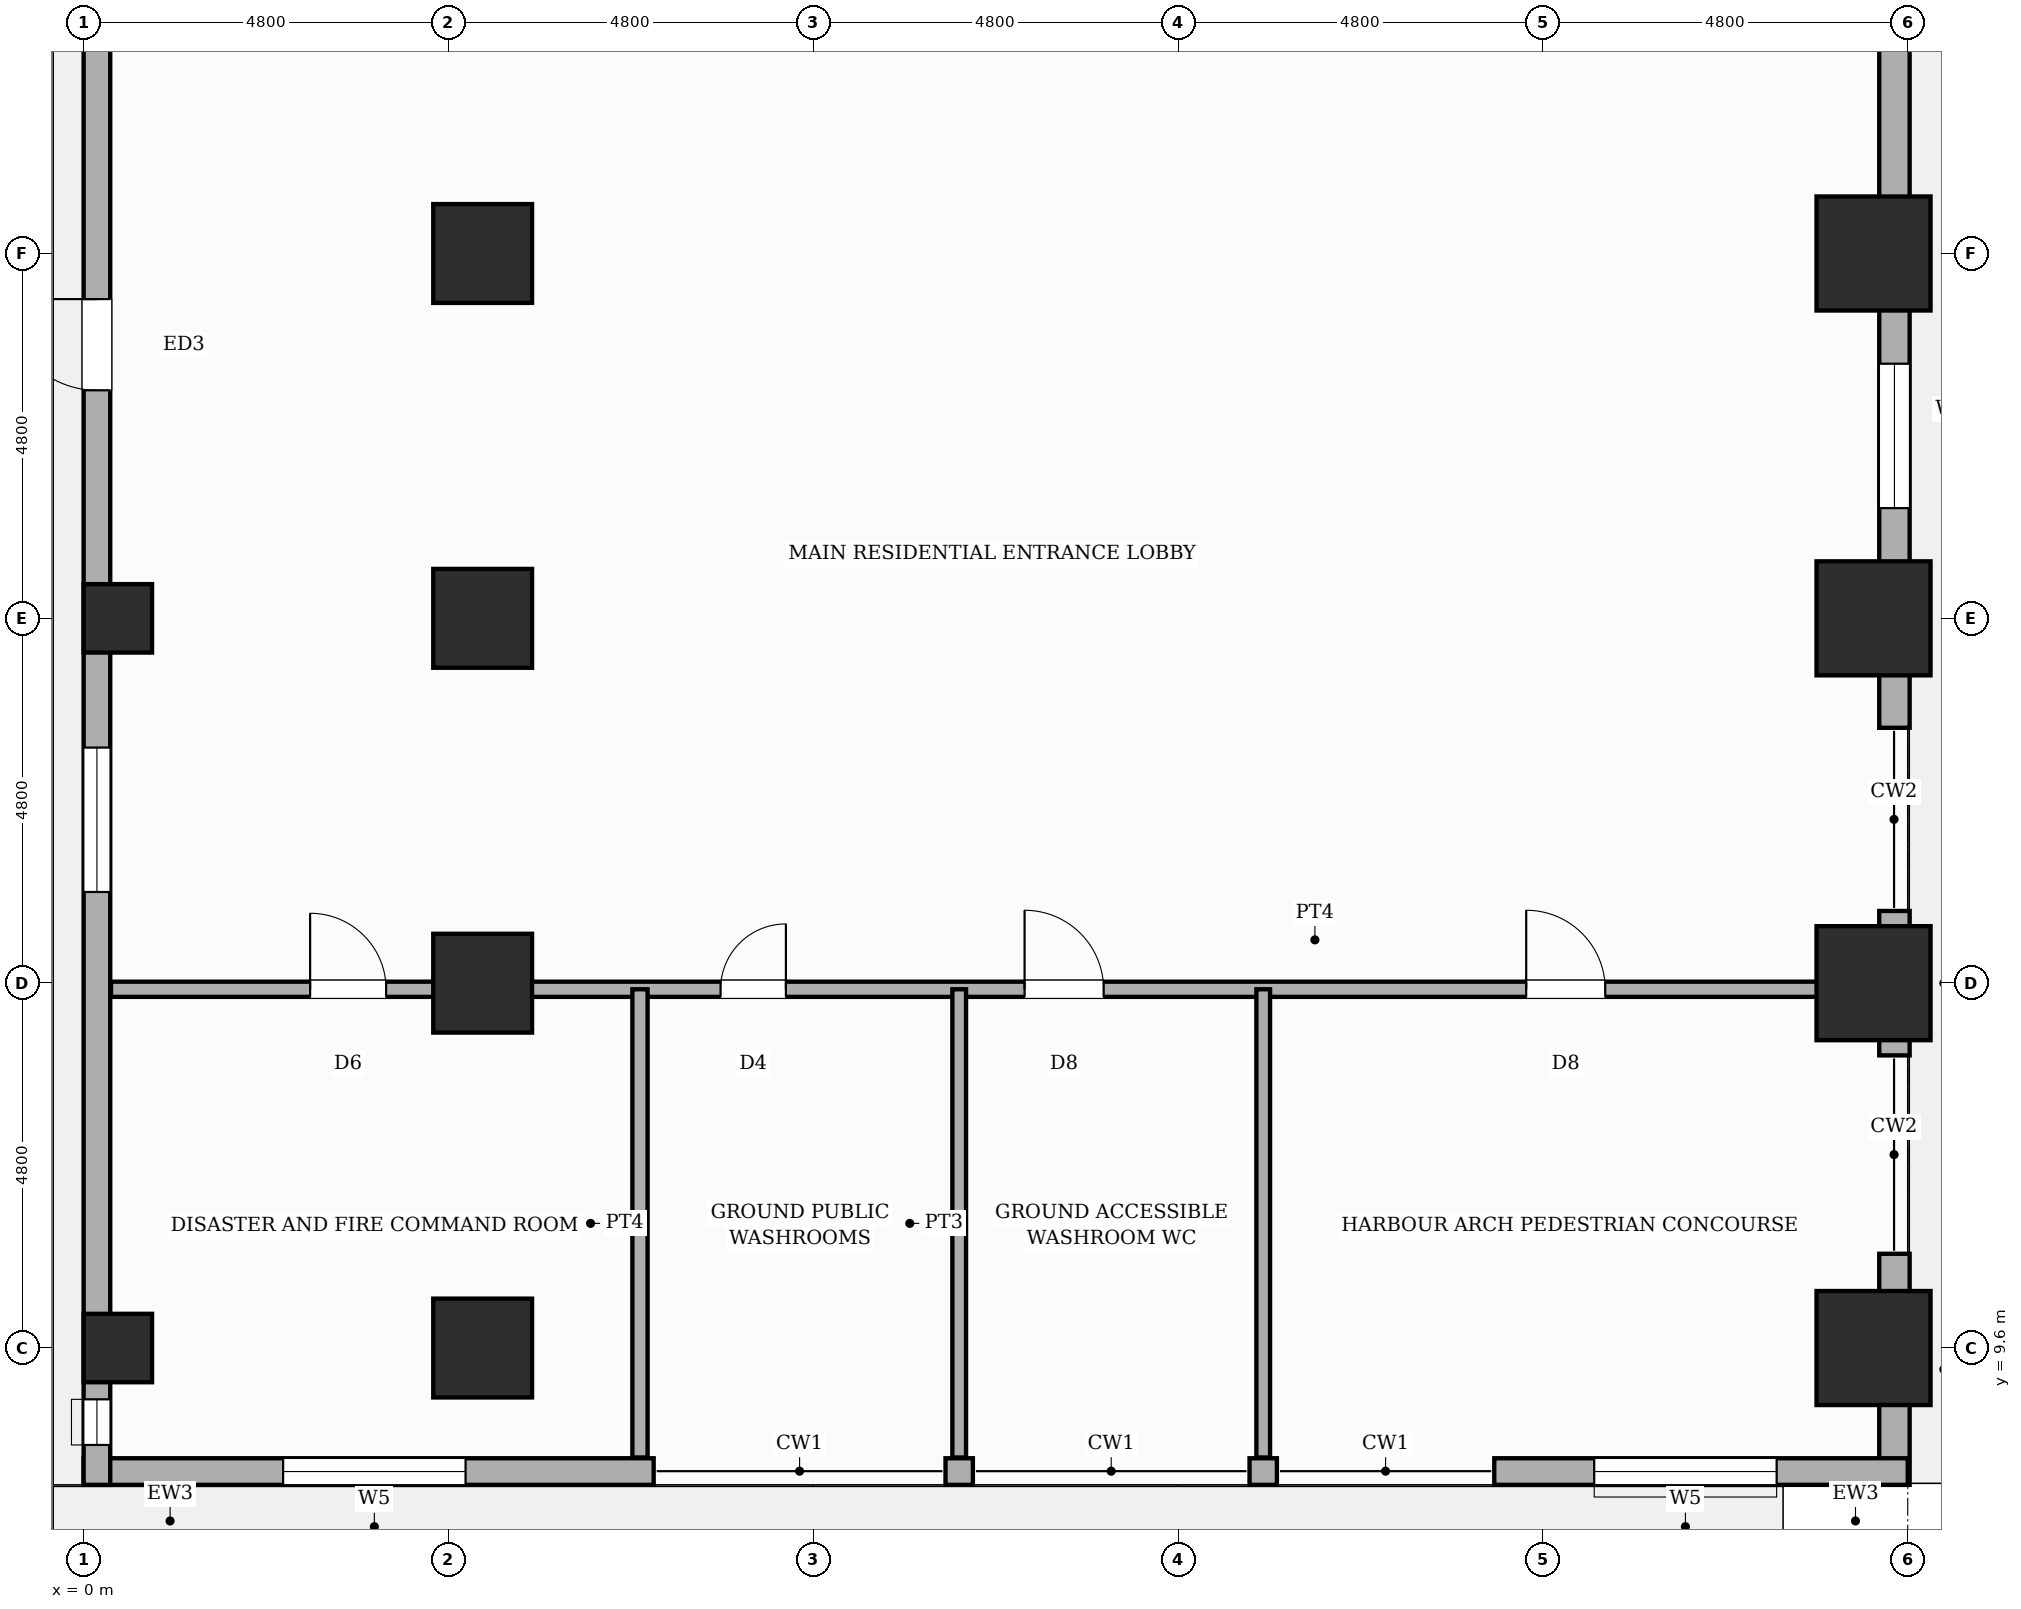
"""IFC4 building model, lengths in metres.
Left out: names, types, materials, properties, quantities, classifications, styles, units other than length and angle.
Written with IfcOpenShell. Run it as: python <this file> out.ifc"""

import sys

from ifc_helpers import new_model, si_unit, direction, frame, frame_2d, origin, origin_2d, place, context, subcontext, project, spatial, rectangle, circle, extrude, element, fill, save


model = new_model("IFC4")
c1 = context("Model", 3, precision=1e-05, world=origin(), true_north=direction((0.0, 1.0)))
c2 = subcontext(c1, "Body", "Model", "MODEL_VIEW")
j1 = project(units=[si_unit("LENGTHUNIT", "METRE"), si_unit("PLANEANGLEUNIT", "RADIAN")], contexts=[c1])
p1 = place(None, origin())
s1 = spatial("IfcSite", under=j1, at=p1, CompositionType="ELEMENT")
p2 = place(p1, origin())
s2 = spatial("IfcBuilding", under=s1, at=p2, CompositionType="ELEMENT")
p3 = place(p2, origin())
s3 = spatial("IfcBuildingStorey", under=s2, at=p3, CompositionType="ELEMENT", Elevation=0.0)
for number, where, z_axis, x_axis in (
    (1, (0.45, 9.6, 0.0), (0.0, 0.0, 1.0), (1.0, 0.0, 0.0)),
    (2, (0.45, 19.2, 0.0), (0.0, 0.0, 1.0), (1.0, 0.0, 0.0)),
):
    element("IfcColumn", number, at=place(p3, frame(where, z_axis=z_axis, x_axis=x_axis)), inside=s3, PredefinedType="COLUMN", context=c2, shape_type="SweptSolid", body=[
        extrude(circle(Radius=0.45, at=origin_2d()), origin(), (0.0, 0.0, 1.0), 5.2),
    ])
for number, where, z_axis, x_axis in (
    (3, (5.25, 9.6, 0.0), (0.0, 0.0, 1.0), (1.0, 0.0, 0.0)),
    (4, (5.25, 14.4, 0.0), (0.0, 0.0, 1.0), (1.0, 0.0, 0.0)),
    (5, (5.25, 19.2, 0.0), (0.0, 0.0, 1.0), (1.0, 0.0, 0.0)),
    (6, (5.25, 24.0, 0.0), (0.0, 0.0, 1.0), (1.0, 0.0, 0.0)),
):
    element("IfcColumn", number, at=place(p3, frame(where, z_axis=z_axis, x_axis=x_axis)), inside=s3, PredefinedType="COLUMN", context=c2, shape_type="SweptSolid", body=[
        extrude(rectangle(XDim=1.3, YDim=1.3, at=origin_2d()), origin(), (0.0, 0.0, 1.0), 5.2),
    ])
for number, where, z_axis, x_axis in (
    (7, (23.55, 9.6, 0.0), (0.0, 0.0, 1.0), (1.0, 0.0, 0.0)),
    (8, (23.55, 14.4, 0.0), (0.0, 0.0, 1.0), (1.0, 0.0, 0.0)),
    (9, (23.55, 19.2, 0.0), (0.0, 0.0, 1.0), (1.0, 0.0, 0.0)),
    (10, (23.55, 24.0, 0.0), (0.0, 0.0, 1.0), (1.0, 0.0, 0.0)),
):
    element("IfcColumn", number, at=place(p3, frame(where, z_axis=z_axis, x_axis=x_axis)), inside=s3, PredefinedType="USERDEFINED", context=c2, shape_type="SweptSolid", body=[
        extrude(rectangle(XDim=1.5, YDim=1.5, at=origin_2d()), origin(), (0.0, 0.0, 1.0), 5.2),
    ])
p4 = place(p3, frame((23.825, 48.0, 0.0), z_axis=(0.0, 0.0, 1.0), x_axis=(0.0, -1.0, 0.0)))
e11 = element("IfcWall", 11, at=p4, inside=s3, PredefinedType="SOLIDWALL", context=c2, shape_type="SweptSolid", body=[
    extrude(rectangle(XDim=30.24, YDim=0.4, at=frame_2d((15.12, 0.0))), origin(), (0.0, 0.0, 1.0), 3.97),
])
p5 = place(p4, frame((25.45, 0.0, 0.85)))
e12 = element("IfcOpeningElement", 12, at=p5, cuts=e11, PredefinedType="OPENING", context=c2, shape_type="SweptSolid", body=[
    extrude(rectangle(XDim=1.9, YDim=2.6, at=frame_2d((0.95, 1.3))), frame((0.0, 0.21, 0.0), z_axis=(0.0, -1.0, 0.0), x_axis=(1.0, 0.0, 0.0)), (0.0, 0.0, 1.0), 0.42),
])
p6 = place(p3, frame((23.825, 15.35, 0.0), z_axis=(0.0, 0.0, 1.0), x_axis=(0.0, -1.0, 0.0)))
e13 = element("IfcWall", 13, at=p6, inside=s3, PredefinedType="SOLIDWALL", context=c2, shape_type="SweptSolid", body=[
    extrude(rectangle(XDim=1.9, YDim=0.4, at=frame_2d((0.95, 0.0))), origin(), (0.0, 0.0, 1.0), 3.97),
])
p7 = place(p3, frame((23.825, 10.84, 0.0), z_axis=(0.0, 0.0, 1.0), x_axis=(0.0, -1.0, 0.0)))
e14 = element("IfcWall", 14, at=p7, inside=s3, PredefinedType="SOLIDWALL", context=c2, shape_type="SweptSolid", body=[
    extrude(rectangle(XDim=3.04, YDim=0.4, at=frame_2d((1.52, 0.0))), origin(), (0.0, 0.0, 1.0), 3.97),
])
p8 = place(p3, frame((24.0, 7.975, 0.0), z_axis=(0.0, 0.0, 1.0), x_axis=(-1.0, 0.0, 0.0)))
e15 = element("IfcWall", 15, at=p8, inside=s3, PredefinedType="STANDARD", context=c2, shape_type="SweptSolid", body=[
    extrude(rectangle(XDim=5.44, YDim=0.35, at=frame_2d((2.72, 0.0))), origin(), (0.0, 0.0, 1.0), 4.89),
])
p9 = place(p8, frame((1.725, 0.0, 0.85)))
e16 = element("IfcOpeningElement", 16, at=p9, cuts=e15, PredefinedType="OPENING", context=c2, shape_type="SweptSolid", body=[
    extrude(rectangle(XDim=2.4, YDim=3.2, at=frame_2d((1.2, 1.6))), frame((0.0, 0.185, 0.0), z_axis=(0.0, -1.0, 0.0), x_axis=(1.0, 0.0, 0.0)), (0.0, 0.0, 1.0), 0.37),
])
for number, where, z_axis, x_axis in (
    (17, (15.7, 7.975, 0.0), (0.0, 0.0, 1.0), (-1.0, 0.0, 0.0)),
    (18, (11.7, 7.975, 0.0), (0.0, 0.0, 1.0), (-1.0, 0.0, 0.0)),
):
    element("IfcWall", number, at=place(p3, frame(where, z_axis=z_axis, x_axis=x_axis)), inside=s3, PredefinedType="STANDARD", context=c2, shape_type="SweptSolid", body=[
        extrude(rectangle(XDim=0.36, YDim=0.35, at=frame_2d((0.18, 0.0))), origin(), (0.0, 0.0, 1.0), 4.89),
    ])
p10 = place(p3, frame((7.5, 7.975, 0.0), z_axis=(0.0, 0.0, 1.0), x_axis=(-1.0, 0.0, 0.0)))
e19 = element("IfcWall", 19, at=p10, inside=s3, PredefinedType="STANDARD", context=c2, shape_type="SweptSolid", body=[
    extrude(rectangle(XDim=7.5, YDim=0.35, at=frame_2d((3.75, 0.0))), origin(), (0.0, 0.0, 1.0), 4.89),
])
p11 = place(p10, frame((2.475, 0.0, 0.85)))
e20 = element("IfcOpeningElement", 20, at=p11, cuts=e19, PredefinedType="OPENING", context=c2, shape_type="SweptSolid", body=[
    extrude(rectangle(XDim=2.4, YDim=3.2, at=frame_2d((1.2, 1.6))), frame((0.0, 0.185, 0.0), z_axis=(0.0, -1.0, 0.0), x_axis=(1.0, 0.0, 0.0)), (0.0, 0.0, 1.0), 0.37),
])
p12 = place(p3, frame((0.175, 7.8, 0.0), z_axis=(0.0, 0.0, 1.0), x_axis=(0.0, 1.0, 0.0)))
e21 = element("IfcWall", 21, at=p12, inside=s3, PredefinedType="STANDARD", context=c2, shape_type="SweptSolid", body=[
    extrude(rectangle(XDim=40.2, YDim=0.35, at=frame_2d((20.1, 0.0))), origin(), (0.0, 0.0, 1.0), 3.97),
])
p13 = place(p12, frame((23.9, 0.0, 0.0)))
e22 = element("IfcOpeningElement", 22, at=p13, cuts=e21, PredefinedType="OPENING", context=c2, shape_type="SweptSolid", body=[
    extrude(rectangle(XDim=1.8, YDim=2.3, at=frame_2d((0.9, 1.15))), frame((0.0, 0.185, 0.0), z_axis=(0.0, -1.0, 0.0), x_axis=(1.0, 0.0, 0.0)), (0.0, 0.0, 1.0), 0.37),
])
p14 = place(p12, frame((14.4, 0.0, 0.0)))
e23 = element("IfcOpeningElement", 23, at=p14, cuts=e21, PredefinedType="OPENING", context=c2, shape_type="SweptSolid", body=[
    extrude(rectangle(XDim=1.2, YDim=2.25, at=frame_2d((0.6, 1.125))), frame((0.0, 0.185, 0.0), z_axis=(0.0, -1.0, 0.0), x_axis=(1.0, 0.0, 0.0)), (0.0, 0.0, 1.0), 0.37),
])
p15 = place(p12, frame((7.8, 0.0, 0.85)))
e24 = element("IfcOpeningElement", 24, at=p15, cuts=e21, PredefinedType="OPENING", context=c2, shape_type="SweptSolid", body=[
    extrude(rectangle(XDim=1.9, YDim=2.6, at=frame_2d((0.95, 1.3))), frame((0.0, 0.185, 0.0), z_axis=(0.0, -1.0, 0.0), x_axis=(1.0, 0.0, 0.0)), (0.0, 0.0, 1.0), 0.37),
])
p16 = place(p12, frame((0.525, 0.0, 0.45)))
e25 = element("IfcOpeningElement", 25, at=p16, cuts=e21, PredefinedType="OPENING", context=c2, shape_type="SweptSolid", body=[
    extrude(rectangle(XDim=0.6, YDim=1.8, at=frame_2d((0.3, 0.9))), frame((0.0, 0.185, 0.0), z_axis=(0.0, -1.0, 0.0), x_axis=(1.0, 0.0, 0.0)), (0.0, 0.0, 1.0), 0.37),
])
p17 = place(p12, frame((27.5, 0.0, 0.85)))
e26 = element("IfcOpeningElement", 26, at=p17, cuts=e21, PredefinedType="OPENING", context=c2, shape_type="SweptSolid", body=[
    extrude(rectangle(XDim=1.9, YDim=2.6, at=frame_2d((0.95, 1.3))), frame((0.0, 0.185, 0.0), z_axis=(0.0, -1.0, 0.0), x_axis=(1.0, 0.0, 0.0)), (0.0, 0.0, 1.0), 0.37),
])
p18 = place(p3, frame((0.36, 14.32, 0.0), z_axis=(0.0, 0.0, 1.0), x_axis=(1.0, 0.0, 0.0)))
e27 = element("IfcWall", 27, at=p18, inside=s3, PredefinedType="PARTITIONING", context=c2, shape_type="SweptSolid", body=[
    extrude(rectangle(XDim=23.26, YDim=0.2, at=frame_2d((11.63, 0.0))), origin(), (0.0, 0.0, 1.0), 3.97),
])
p19 = place(p18, frame((2.62, 0.0, 0.0)))
e28 = element("IfcOpeningElement", 28, at=p19, cuts=e27, PredefinedType="OPENING", context=c2, shape_type="SweptSolid", body=[
    extrude(rectangle(XDim=1.0, YDim=2.15, at=frame_2d((0.5, 1.075))), frame((0.0, 0.11, 0.0), z_axis=(0.0, -1.0, 0.0), x_axis=(1.0, 0.0, 0.0)), (0.0, 0.0, 1.0), 0.22),
])
p20 = place(p18, frame((8.02, 0.0, 0.0)))
e29 = element("IfcOpeningElement", 29, at=p20, cuts=e27, PredefinedType="OPENING", context=c2, shape_type="SweptSolid", body=[
    extrude(rectangle(XDim=0.86, YDim=2.1, at=frame_2d((0.43, 1.05))), frame((0.0, 0.11, 0.0), z_axis=(0.0, -1.0, 0.0), x_axis=(1.0, 0.0, 0.0)), (0.0, 0.0, 1.0), 0.22),
])
p21 = place(p18, frame((12.02, 0.0, 0.0)))
e30 = element("IfcOpeningElement", 30, at=p21, cuts=e27, PredefinedType="OPENING", context=c2, shape_type="SweptSolid", body=[
    extrude(rectangle(XDim=1.04, YDim=2.15, at=frame_2d((0.52, 1.075))), frame((0.0, 0.11, 0.0), z_axis=(0.0, -1.0, 0.0), x_axis=(1.0, 0.0, 0.0)), (0.0, 0.0, 1.0), 0.22),
])
p22 = place(p18, frame((18.62, 0.0, 0.0)))
e31 = element("IfcOpeningElement", 31, at=p22, cuts=e27, PredefinedType="OPENING", context=c2, shape_type="SweptSolid", body=[
    extrude(rectangle(XDim=1.04, YDim=2.15, at=frame_2d((0.52, 1.075))), frame((0.0, 0.11, 0.0), z_axis=(0.0, -1.0, 0.0), x_axis=(1.0, 0.0, 0.0)), (0.0, 0.0, 1.0), 0.22),
])
p23 = place(p3, frame((7.32, 8.16, 0.0), z_axis=(0.0, 0.0, 1.0), x_axis=(0.0, 1.0, 0.0)))
e32 = element("IfcWall", 32, at=p23, inside=s3, PredefinedType="PARTITIONING", context=c2, shape_type="SweptSolid", body=[
    extrude(rectangle(XDim=6.16, YDim=0.2, at=frame_2d((3.08, 0.0))), origin(), (0.0, 0.0, 1.0), 4.89),
])
for number, where, z_axis, x_axis in (
    (33, (11.52, 8.16, 0.0), (0.0, 0.0, 1.0), (0.0, 1.0, 0.0)),
    (34, (15.52, 8.16, 0.0), (0.0, 0.0, 1.0), (0.0, 1.0, 0.0)),
):
    element("IfcWall", number, at=place(p3, frame(where, z_axis=z_axis, x_axis=x_axis)), inside=s3, PredefinedType="PLUMBINGWALL", context=c2, shape_type="SweptSolid", body=[
        extrude(rectangle(XDim=6.16, YDim=0.18, at=frame_2d((3.08, 0.0))), origin(), (0.0, 0.0, 1.0), 4.89),
    ])
p24 = place(p5, origin())
e35 = element("IfcWindow", 35, at=p24, inside=s3, PartitioningType="SINGLE_PANEL", PredefinedType="WINDOW", context=c2, shape_type="SweptSolid", body=[
    extrude(rectangle(XDim=1.9, YDim=2.6, at=frame_2d((0.95, 1.3))), frame((0.0, 0.03, 0.0), z_axis=(0.0, -1.0, 0.0), x_axis=(1.0, 0.0, 0.0)), (0.0, 0.0, 1.0), 0.06),
])
fill(e12, e35)
p25 = place(p9, origin())
e36 = element("IfcWindow", 36, at=p25, inside=s3, PartitioningType="SINGLE_PANEL", PredefinedType="WINDOW", context=c2, shape_type="SweptSolid", body=[
    extrude(rectangle(XDim=2.4, YDim=3.2, at=frame_2d((1.2, 1.6))), frame((0.0, 0.03, 0.0), z_axis=(0.0, -1.0, 0.0), x_axis=(1.0, 0.0, 0.0)), (0.0, 0.0, 1.0), 0.06),
])
fill(e16, e36)
p26 = place(p11, origin())
e37 = element("IfcWindow", 37, at=p26, inside=s3, PartitioningType="SINGLE_PANEL", PredefinedType="WINDOW", context=c2, shape_type="SweptSolid", body=[
    extrude(rectangle(XDim=2.4, YDim=3.2, at=frame_2d((1.2, 1.6))), frame((0.0, 0.03, 0.0), z_axis=(0.0, -1.0, 0.0), x_axis=(1.0, 0.0, 0.0)), (0.0, 0.0, 1.0), 0.06),
])
fill(e20, e37)
p27 = place(p14, origin())
e38 = element("IfcDoor", 38, at=p27, inside=s3, OperationType="SINGLE_SWING_RIGHT", PredefinedType="DOOR", context=c2, shape_type="SweptSolid", body=[
    extrude(rectangle(XDim=1.2, YDim=2.25, at=frame_2d((0.6, 1.125))), frame((0.0, 0.025, 0.0), z_axis=(0.0, -1.0, 0.0), x_axis=(1.0, 0.0, 0.0)), (0.0, 0.0, 1.0), 0.05),
])
fill(e23, e38)
p28 = place(p15, origin())
e39 = element("IfcWindow", 39, at=p28, inside=s3, PartitioningType="SINGLE_PANEL", PredefinedType="WINDOW", context=c2, shape_type="SweptSolid", body=[
    extrude(rectangle(XDim=1.9, YDim=2.6, at=frame_2d((0.95, 1.3))), frame((0.0, 0.03, 0.0), z_axis=(0.0, -1.0, 0.0), x_axis=(1.0, 0.0, 0.0)), (0.0, 0.0, 1.0), 0.06),
])
fill(e24, e39)
p29 = place(p16, origin())
e40 = element("IfcWindow", 40, at=p29, inside=s3, PartitioningType="SINGLE_PANEL", PredefinedType="WINDOW", context=c2, shape_type="SweptSolid", body=[
    extrude(rectangle(XDim=0.6, YDim=1.8, at=frame_2d((0.3, 0.9))), frame((0.0, 0.03, 0.0), z_axis=(0.0, -1.0, 0.0), x_axis=(1.0, 0.0, 0.0)), (0.0, 0.0, 1.0), 0.06),
])
fill(e25, e40)
p30 = place(p19, origin())
e41 = element("IfcDoor", 41, at=p30, inside=s3, OperationType="SINGLE_SWING_LEFT", PredefinedType="DOOR", context=c2, shape_type="SweptSolid", body=[
    extrude(rectangle(XDim=1.0, YDim=2.15, at=frame_2d((0.5, 1.075))), frame((0.0, 0.025, 0.0), z_axis=(0.0, -1.0, 0.0), x_axis=(1.0, 0.0, 0.0)), (0.0, 0.0, 1.0), 0.05),
])
fill(e28, e41)
p31 = place(p20, origin())
e42 = element("IfcDoor", 42, at=p31, inside=s3, OperationType="SINGLE_SWING_RIGHT", PredefinedType="DOOR", context=c2, shape_type="SweptSolid", body=[
    extrude(rectangle(XDim=0.86, YDim=2.1, at=frame_2d((0.43, 1.05))), frame((0.0, 0.025, 0.0), z_axis=(0.0, -1.0, 0.0), x_axis=(1.0, 0.0, 0.0)), (0.0, 0.0, 1.0), 0.05),
])
fill(e29, e42)
p32 = place(p21, origin())
e43 = element("IfcDoor", 43, at=p32, inside=s3, OperationType="SINGLE_SWING_LEFT", PredefinedType="DOOR", context=c2, shape_type="SweptSolid", body=[
    extrude(rectangle(XDim=1.04, YDim=2.15, at=frame_2d((0.52, 1.075))), frame((0.0, 0.025, 0.0), z_axis=(0.0, -1.0, 0.0), x_axis=(1.0, 0.0, 0.0)), (0.0, 0.0, 1.0), 0.05),
])
fill(e30, e43)
p33 = place(p22, origin())
e44 = element("IfcDoor", 44, at=p33, inside=s3, OperationType="SINGLE_SWING_LEFT", PredefinedType="DOOR", context=c2, shape_type="SweptSolid", body=[
    extrude(rectangle(XDim=1.04, YDim=2.15, at=frame_2d((0.52, 1.075))), frame((0.0, 0.025, 0.0), z_axis=(0.0, -1.0, 0.0), x_axis=(1.0, 0.0, 0.0)), (0.0, 0.0, 1.0), 0.05),
])
fill(e31, e44)
save(model, sys.argv[1])
